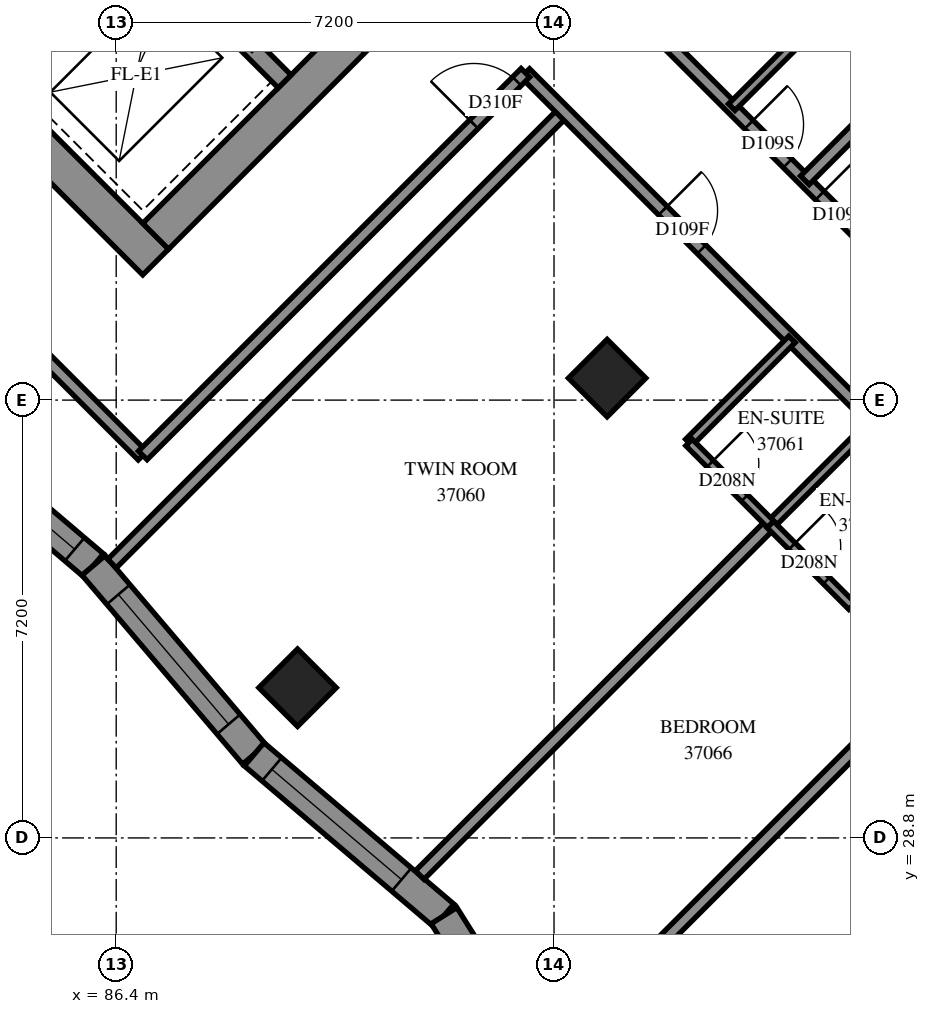
"""IFC4 building model, lengths in metres.
Left out: names, types, materials, properties, quantities, classifications, styles, units other than length and angle.
Written with IfcOpenShell. Run it as: python <this file> out.ifc"""

import sys

from ifc_helpers import new_model, si_unit, direction, frame, frame_2d, origin, origin_2d, place, context, subcontext, project, spatial, polyline, rectangle, outline, extrude, element, fill, save


model = new_model("IFC4")
c1 = context("Model", 3, precision=1e-05, world=origin(), true_north=direction((0.0, 1.0)))
c2 = subcontext(c1, "Body", "Model", "MODEL_VIEW")
j1 = project(units=[si_unit("LENGTHUNIT", "METRE"), si_unit("PLANEANGLEUNIT", "RADIAN")], contexts=[c1])
p1 = place(None, origin())
s1 = spatial("IfcSite", under=j1, at=p1, CompositionType="ELEMENT")
p2 = place(p1, origin())
s2 = spatial("IfcBuilding", under=s1, at=p2, CompositionType="ELEMENT")
p3 = place(p2, frame((0.0, 0.0, 138.8)))
s3 = spatial("IfcBuildingStorey", under=s2, at=p3, CompositionType="ELEMENT", Elevation=138.8)
for number, where, z_axis, x_axis in (
    (1, (94.474, 36.362, 0.0), (0.0, 0.0, 1.0), (0.707, -0.707, 0.0)),
    (2, (89.382, 31.271, 0.0), (0.0, 0.0, 1.0), (0.707, -0.707, 0.0)),
):
    element("IfcColumn", number, at=place(p3, frame(where, z_axis=z_axis, x_axis=x_axis)), inside=s3, PredefinedType="COLUMN", context=c2, shape_type="SweptSolid", body=[
        extrude(rectangle(XDim=0.9, YDim=0.9, at=origin_2d()), origin(), (0.0, 0.0, 1.0), 3.1),
    ])
p4 = place(p3, frame((76.018, 49.302, -0.3), z_axis=(0.0, 0.0, 1.0), x_axis=(0.7071067812, -0.7071067812, 0.0)))
e3 = element("IfcWall", 3, at=p4, inside=s3, PredefinedType="SHEAR", context=c2, shape_type="SweptSolid", body=[
    extrude(rectangle(XDim=15.6, YDim=0.6, at=frame_2d((7.8, 0.0))), origin(), (0.0, 0.0, 1.0), 2.7),
])
p5 = place(p3, frame((87.049, 38.695, -0.3), z_axis=(0.0, 0.0, 1.0), x_axis=(0.7071067812, 0.7071067812, 0.0)))
e4 = element("IfcWall", 4, at=p5, inside=s3, PredefinedType="SHEAR", context=c2, shape_type="SweptSolid", body=[
    extrude(rectangle(XDim=14.4, YDim=0.6, at=frame_2d((7.2, 0.0))), origin(), (0.0, 0.0, 1.0), 2.7),
])
p6 = place(p5, frame((4.55, 0.0, 0.3)))
e5 = element("IfcOpeningElement", 5, at=p6, cuts=e4, PredefinedType="OPENING", context=c2, shape_type="SweptSolid", body=[
    extrude(rectangle(XDim=1.1, YDim=2.1, at=frame_2d((0.55, 1.05))), frame((0.0, 0.31, 0.0), z_axis=(0.0, -1.0, 0.0), x_axis=(1.0, 0.0, 0.0)), (0.0, 0.0, 1.0), 0.62),
])
p7 = place(p5, frame((11.35, 0.0, 0.3)))
e6 = element("IfcOpeningElement", 6, at=p7, cuts=e4, PredefinedType="OPENING", context=c2, shape_type="SweptSolid", body=[
    extrude(rectangle(XDim=1.1, YDim=2.1, at=frame_2d((0.55, 1.05))), frame((0.0, 0.31, 0.0), z_axis=(0.0, -1.0, 0.0), x_axis=(1.0, 0.0, 0.0)), (0.0, 0.0, 1.0), 0.62),
])
p8 = place(p3, frame((84.291, 41.453, 0.0), z_axis=(0.0, 0.0, 1.0), x_axis=(0.7071067812, 0.7071067812, 0.0)))
e7 = element("IfcWall", 7, at=p8, inside=s3, PredefinedType="SOLIDWALL", context=c2, shape_type="SweptSolid", body=[
    extrude(rectangle(XDim=3.3, YDim=0.3, at=frame_2d((1.65, 0.0))), origin(), (0.0, 0.0, 1.0), 3.1),
])
p9 = place(p3, frame((78.988, 51.423, 0.0), z_axis=(0.0, 0.0, 1.0), x_axis=(0.7071067812, -0.7071067812, 0.0)))
e8 = element("IfcWall", 8, at=p9, inside=s3, PredefinedType="SOLIDWALL", context=c2, shape_type="SweptSolid", body=[
    extrude(rectangle(XDim=14.4, YDim=0.3, at=frame_2d((7.2, 0.0))), origin(), (0.0, 0.0, 1.0), 3.1),
])
p10 = place(p9, frame((1.35, 0.0, 0.0)))
e9 = element("IfcOpeningElement", 9, at=p10, cuts=e8, PredefinedType="OPENING", context=c2, shape_type="SweptSolid", body=[
    extrude(rectangle(XDim=0.9, YDim=2.1, at=frame_2d((0.45, 1.05))), frame((0.0, 0.16, 0.0), z_axis=(0.0, -1.0, 0.0), x_axis=(1.0, 0.0, 0.0)), (0.0, 0.0, 1.0), 0.32),
])
p11 = place(p9, frame((4.95, 0.0, 0.0)))
e10 = element("IfcOpeningElement", 10, at=p11, cuts=e8, PredefinedType="OPENING", context=c2, shape_type="SweptSolid", body=[
    extrude(rectangle(XDim=0.9, YDim=2.1, at=frame_2d((0.45, 1.05))), frame((0.0, 0.16, 0.0), z_axis=(0.0, -1.0, 0.0), x_axis=(1.0, 0.0, 0.0)), (0.0, 0.0, 1.0), 0.32),
])
p12 = place(p9, frame((8.55, 0.0, 0.0)))
e11 = element("IfcOpeningElement", 11, at=p12, cuts=e8, PredefinedType="OPENING", context=c2, shape_type="SweptSolid", body=[
    extrude(rectangle(XDim=0.9, YDim=2.1, at=frame_2d((0.45, 1.05))), frame((0.0, 0.16, 0.0), z_axis=(0.0, -1.0, 0.0), x_axis=(1.0, 0.0, 0.0)), (0.0, 0.0, 1.0), 0.32),
])
p13 = place(p9, frame((12.05, 0.0, 0.0)))
e12 = element("IfcOpeningElement", 12, at=p13, cuts=e8, PredefinedType="OPENING", context=c2, shape_type="SweptSolid", body=[
    extrude(rectangle(XDim=1.1, YDim=2.1, at=frame_2d((0.55, 1.05))), frame((0.0, 0.16, 0.0), z_axis=(0.0, -1.0, 0.0), x_axis=(1.0, 0.0, 0.0)), (0.0, 0.0, 1.0), 0.32),
])
p14 = place(p3, frame((82.921, 35.923, 0.0), z_axis=(0.0, 0.0, 1.0), x_axis=(0.7620191747, -0.647554459, 0.0)))
e13 = element("IfcWall", 13, at=p14, inside=s3, PredefinedType="SOLIDWALL", context=c2, shape_type="SweptSolid", body=[
    extrude(outline(polyline([(-0.02, -0.25), (4.058, -0.25), (4.098, 0.25), (0.02, 0.25), (-0.02, -0.25)])), origin(), (0.0, 0.0, 1.0), 3.1),
])
p15 = place(p14, frame((0.87, 0.0, 0.45)))
e14 = element("IfcOpeningElement", 14, at=p15, cuts=e13, PredefinedType="OPENING", context=c2, shape_type="SweptSolid", body=[
    extrude(rectangle(XDim=2.8, YDim=2.5, at=frame_2d((1.4, 1.25))), frame((0.0, 0.26, 0.0), z_axis=(0.0, -1.0, 0.0), x_axis=(1.0, 0.0, 0.0)), (0.0, 0.0, 1.0), 0.52),
])
p16 = place(p3, frame((86.028, 33.282, 0.0), z_axis=(0.0, 0.0, 1.0), x_axis=(0.647554459, -0.7620191747, 0.0)))
e15 = element("IfcWall", 15, at=p16, inside=s3, PredefinedType="SOLIDWALL", context=c2, shape_type="SweptSolid", body=[
    extrude(outline(polyline([(0.02, -0.25), (4.098, -0.25), (4.058, 0.25), (-0.02, 0.25), (0.02, -0.25)])), origin(), (0.0, 0.0, 1.0), 3.1),
])
p17 = place(p16, frame((0.629, 0.0, 0.45)))
e16 = element("IfcOpeningElement", 16, at=p17, cuts=e15, PredefinedType="OPENING", context=c2, shape_type="SweptSolid", body=[
    extrude(rectangle(XDim=2.8, YDim=2.5, at=frame_2d((1.4, 1.25))), frame((0.0, 0.26, 0.0), z_axis=(0.0, -1.0, 0.0), x_axis=(1.0, 0.0, 0.0)), (0.0, 0.0, 1.0), 0.52),
])
p18 = place(p3, frame((88.669, 30.175, 0.0), z_axis=(0.0, 0.0, 1.0), x_axis=(0.76200858, -0.6475669262, 0.0)))
e17 = element("IfcWall", 17, at=p18, inside=s3, PredefinedType="SOLIDWALL", context=c2, shape_type="SweptSolid", body=[
    extrude(outline(polyline([(-0.02, -0.25), (4.058, -0.25), (4.135, 0.25), (0.02, 0.25), (-0.02, -0.25)])), origin(), (0.0, 0.0, 1.0), 3.1),
])
p19 = place(p18, frame((0.38, 0.0, 0.45)))
e18 = element("IfcOpeningElement", 18, at=p19, cuts=e17, PredefinedType="OPENING", context=c2, shape_type="SweptSolid", body=[
    extrude(rectangle(XDim=2.8, YDim=2.5, at=frame_2d((1.4, 1.25))), frame((0.0, 0.26, 0.0), z_axis=(0.0, -1.0, 0.0), x_axis=(1.0, 0.0, 0.0)), (0.0, 0.0, 1.0), 0.52),
])
p20 = place(p3, frame((91.791, 27.522, 0.0), z_axis=(0.0, 0.0, 1.0), x_axis=(0.5315858435, -0.847004422, 0.0)))
e19 = element("IfcWall", 19, at=p20, inside=s3, PredefinedType="SOLIDWALL", context=c2, shape_type="SweptSolid", body=[
    extrude(outline(polyline([(0.038, -0.25), (4.208, -0.25), (3.808, 0.25), (-0.038, 0.25), (0.038, -0.25)])), origin(), (0.0, 0.0, 1.0), 3.1),
])
p21 = place(p20, frame((0.96, 0.0, 0.45)))
e20 = element("IfcOpeningElement", 20, at=p21, cuts=e19, PredefinedType="OPENING", context=c2, shape_type="SweptSolid", body=[
    extrude(rectangle(XDim=1.2, YDim=2.5, at=frame_2d((0.6, 1.25))), frame((0.0, 0.26, 0.0), z_axis=(0.0, -1.0, 0.0), x_axis=(1.0, 0.0, 0.0)), (0.0, 0.0, 1.0), 0.52),
])
p22 = place(p3, frame((86.331, 33.312, 0.0), z_axis=(0.0, 0.0, 1.0), x_axis=(0.7071067812, 0.7071067812, 0.0)))
e21 = element("IfcWall", 21, at=p22, inside=s3, PredefinedType="PARTITIONING", context=c2, shape_type="SweptSolid", body=[
    extrude(rectangle(XDim=10.514, YDim=0.2, at=frame_2d((5.257, 0.0))), origin(), (0.0, 0.0, 1.0), 3.1),
])
p23 = place(p3, frame((93.127, 41.379, 0.0), z_axis=(0.0, 0.0, 1.0), x_axis=(0.7071067812, -0.7071067812, 0.0)))
e22 = element("IfcWall", 22, at=p23, inside=s3, PredefinedType="PARTITIONING", context=c2, shape_type="SweptSolid", body=[
    extrude(rectangle(XDim=9.39, YDim=0.2, at=frame_2d((4.695, 0.0))), origin(), (0.0, 0.0, 1.0), 3.1),
])
p24 = place(p23, frame((3.2, 0.0, 0.0)))
e23 = element("IfcOpeningElement", 23, at=p24, cuts=e22, PredefinedType="OPENING", context=c2, shape_type="SweptSolid", body=[
    extrude(rectangle(XDim=0.9, YDim=2.1, at=frame_2d((0.45, 1.05))), frame((0.0, 0.11, 0.0), z_axis=(0.0, -1.0, 0.0), x_axis=(1.0, 0.0, 0.0)), (0.0, 0.0, 1.0), 0.22),
])
p25 = place(p3, frame((80.423, 41.497, 0.0), z_axis=(0.0, 0.0, 1.0), x_axis=(0.7071067812, -0.7071067812, 0.0)))
e24 = element("IfcWall", 24, at=p25, inside=s3, PredefinedType="PARTITIONING", context=c2, shape_type="SweptSolid", body=[
    extrude(rectangle(XDim=9.065, YDim=0.2, at=frame_2d((4.532, 0.0))), origin(), (0.0, 0.0, 1.0), 3.1),
])
p26 = place(p3, frame((86.837, 35.091, 0.0), z_axis=(0.0, 0.0, 1.0), x_axis=(0.7071067812, 0.7071067812, 0.0)))
e25 = element("IfcWall", 25, at=p26, inside=s3, PredefinedType="PARTITIONING", context=c2, shape_type="SweptSolid", body=[
    extrude(rectangle(XDim=8.898, YDim=0.2, at=frame_2d((4.449, 0.0))), origin(), (0.0, 0.0, 1.0), 3.1),
])
p27 = place(p26, frame((7.7, 0.0, 0.0)))
e26 = element("IfcOpeningElement", 26, at=p27, cuts=e25, PredefinedType="OPENING", context=c2, shape_type="SweptSolid", body=[
    extrude(rectangle(XDim=1.0, YDim=2.1, at=frame_2d((0.5, 1.05))), frame((0.0, 0.11, 0.0), z_axis=(0.0, -1.0, 0.0), x_axis=(1.0, 0.0, 0.0)), (0.0, 0.0, 1.0), 0.22),
])
p28 = place(p3, frame((95.177, 42.157, 0.0), z_axis=(0.0, 0.0, 1.0), x_axis=(0.7071067812, -0.7071067812, 0.0)))
e27 = element("IfcWall", 27, at=p28, inside=s3, PredefinedType="PARTITIONING", context=c2, shape_type="SweptSolid", body=[
    extrude(rectangle(XDim=8.491, YDim=0.2, at=frame_2d((4.245, 0.0))), origin(), (0.0, 0.0, 1.0), 3.1),
])
p29 = place(p28, frame((2.3, 0.0, 0.0)))
e28 = element("IfcOpeningElement", 28, at=p29, cuts=e27, PredefinedType="OPENING", context=c2, shape_type="SweptSolid", body=[
    extrude(rectangle(XDim=0.9, YDim=2.1, at=frame_2d((0.45, 1.05))), frame((0.0, 0.11, 0.0), z_axis=(0.0, -1.0, 0.0), x_axis=(1.0, 0.0, 0.0)), (0.0, 0.0, 1.0), 0.22),
])
p30 = place(p28, frame((3.95, 0.0, 0.0)))
e29 = element("IfcOpeningElement", 29, at=p30, cuts=e27, PredefinedType="OPENING", context=c2, shape_type="SweptSolid", body=[
    extrude(rectangle(XDim=0.9, YDim=2.1, at=frame_2d((0.45, 1.05))), frame((0.0, 0.11, 0.0), z_axis=(0.0, -1.0, 0.0), x_axis=(1.0, 0.0, 0.0)), (0.0, 0.0, 1.0), 0.22),
])
p31 = place(p3, frame((91.391, 28.19, 0.0), z_axis=(0.0, 0.0, 1.0), x_axis=(0.7071067812, 0.7071067812, 0.0)))
e30 = element("IfcWall", 30, at=p31, inside=s3, PredefinedType="PARTITIONING", context=c2, shape_type="SweptSolid", body=[
    extrude(rectangle(XDim=8.158, YDim=0.2, at=frame_2d((4.079, 0.0))), origin(), (0.0, 0.0, 1.0), 3.1),
])
p32 = place(p3, frame((94.923, 26.631, 0.0), z_axis=(0.0, 0.0, 1.0), x_axis=(0.7071067812, 0.7071067812, 0.0)))
e31 = element("IfcWall", 31, at=p32, inside=s3, PredefinedType="PARTITIONING", context=c2, shape_type="SweptSolid", body=[
    extrude(rectangle(XDim=5.926, YDim=0.2, at=frame_2d((2.963, 0.0))), origin(), (0.0, 0.0, 1.0), 2.6),
])
for number, where, z_axis, x_axis in (
    (32, (96.523, 40.817, 0.0), (0.0, 0.0, 1.0), (0.707, 0.707, 0.0)),
    (33, (98.503, 32.615, 0.0), (0.0, 0.0, 1.0), (0.707, 0.707, 0.0)),
):
    element("IfcWall", number, at=place(p3, frame(where, z_axis=z_axis, x_axis=x_axis)), inside=s3, PredefinedType="PARTITIONING", context=c2, shape_type="SweptSolid", body=[
        extrude(rectangle(XDim=2.401, YDim=0.15, at=frame_2d((1.201, 0.0))), origin(), (0.0, 0.0, 1.0), 3.1),
    ])
p33 = place(p3, frame((97.163, 33.955, 0.0), z_axis=(0.0, 0.0, 1.0), x_axis=(0.7075233388, 0.706689978, 0.0)))
e34 = element("IfcWall", 34, at=p33, inside=s3, PredefinedType="PARTITIONING", context=c2, shape_type="SweptSolid", body=[
    extrude(rectangle(XDim=2.4, YDim=0.15, at=frame_2d((1.2, 0.0))), origin(), (0.0, 0.0, 1.0), 3.1),
])
p34 = place(p3, frame((95.817, 35.303, 0.0), z_axis=(0.0, 0.0, 1.0), x_axis=(0.7071067812, 0.7071067812, 0.0)))
e35 = element("IfcWall", 35, at=p34, inside=s3, PredefinedType="PARTITIONING", context=c2, shape_type="SweptSolid", body=[
    extrude(rectangle(XDim=2.398, YDim=0.15, at=frame_2d((1.199, 0.0))), origin(), (0.0, 0.0, 1.0), 3.1),
])
p35 = place(p3, frame((97.725, 39.615, 0.0), z_axis=(0.0, 0.0, 1.0), x_axis=(0.7065975219, 0.707615674, 0.0)))
e36 = element("IfcWall", 36, at=p35, inside=s3, PredefinedType="PARTITIONING", context=c2, shape_type="SweptSolid", body=[
    extrude(rectangle(XDim=1.964, YDim=0.2, at=frame_2d((0.982, 0.0))), origin(), (0.0, 0.0, 1.0), 3.1),
])
p36 = place(p3, frame((97.157, 33.955, 0.0), z_axis=(0.0, 0.0, 1.0), x_axis=(0.7071067812, -0.7071067812, 0.0)))
e37 = element("IfcWall", 37, at=p36, inside=s3, PredefinedType="PARTITIONING", context=c2, shape_type="SweptSolid", body=[
    extrude(rectangle(XDim=1.901, YDim=0.15, at=frame_2d((0.95, 0.0))), origin(), (0.0, 0.0, 1.0), 3.1),
])
p37 = place(p36, frame((0.506, 0.0, 0.0)))
e38 = element("IfcOpeningElement", 38, at=p37, cuts=e37, PredefinedType="OPENING", context=c2, shape_type="SweptSolid", body=[
    extrude(rectangle(XDim=0.8, YDim=2.1, at=frame_2d((0.4, 1.05))), frame((0.0, 0.085, 0.0), z_axis=(0.0, -1.0, 0.0), x_axis=(1.0, 0.0, 0.0)), (0.0, 0.0, 1.0), 0.17),
])
p38 = place(p3, frame((95.82, 35.304, 0.0), z_axis=(0.0, 0.0, 1.0), x_axis=(0.7065800724, -0.7076330979, 0.0)))
e39 = element("IfcWall", 39, at=p38, inside=s3, PredefinedType="PARTITIONING", context=c2, shape_type="SweptSolid", body=[
    extrude(rectangle(XDim=1.899, YDim=0.15, at=frame_2d((0.95, 0.0))), origin(), (0.0, 0.0, 1.0), 3.1),
])
p39 = place(p38, frame((0.493, 0.0, 0.0)))
e40 = element("IfcOpeningElement", 40, at=p39, cuts=e39, PredefinedType="OPENING", context=c2, shape_type="SweptSolid", body=[
    extrude(rectangle(XDim=0.8, YDim=2.1, at=frame_2d((0.4, 1.05))), frame((0.0, 0.085, 0.0), z_axis=(0.0, -1.0, 0.0), x_axis=(1.0, 0.0, 0.0)), (0.0, 0.0, 1.0), 0.17),
])
p40 = place(p15, origin())
e41 = element("IfcWindow", 41, at=p40, inside=s3, PartitioningType="SINGLE_PANEL", PredefinedType="WINDOW", context=c2, shape_type="SweptSolid", body=[
    extrude(rectangle(XDim=2.8, YDim=2.5, at=frame_2d((1.4, 1.25))), frame((0.0, 0.18, 0.0), z_axis=(0.0, -1.0, 0.0), x_axis=(1.0, 0.0, 0.0)), (0.0, 0.0, 1.0), 0.06),
])
fill(e14, e41)
p41 = place(p17, origin())
e42 = element("IfcWindow", 42, at=p41, inside=s3, PartitioningType="SINGLE_PANEL", PredefinedType="WINDOW", context=c2, shape_type="SweptSolid", body=[
    extrude(rectangle(XDim=2.8, YDim=2.5, at=frame_2d((1.4, 1.25))), frame((0.0, 0.18, 0.0), z_axis=(0.0, -1.0, 0.0), x_axis=(1.0, 0.0, 0.0)), (0.0, 0.0, 1.0), 0.06),
])
fill(e16, e42)
p42 = place(p19, origin())
e43 = element("IfcWindow", 43, at=p42, inside=s3, PartitioningType="SINGLE_PANEL", PredefinedType="WINDOW", context=c2, shape_type="SweptSolid", body=[
    extrude(rectangle(XDim=2.8, YDim=2.5, at=frame_2d((1.4, 1.25))), frame((0.0, 0.18, 0.0), z_axis=(0.0, -1.0, 0.0), x_axis=(1.0, 0.0, 0.0)), (0.0, 0.0, 1.0), 0.06),
])
fill(e18, e43)
p43 = place(p29, origin())
e44 = element("IfcDoor", 44, at=p43, inside=s3, OperationType="SINGLE_SWING_RIGHT", PredefinedType="DOOR", context=c2, shape_type="SweptSolid", body=[
    extrude(rectangle(XDim=0.9, YDim=2.1, at=frame_2d((0.45, 1.05))), frame((0.0, 0.025, 0.0), z_axis=(0.0, -1.0, 0.0), x_axis=(1.0, 0.0, 0.0)), (0.0, 0.0, 1.0), 0.05),
])
fill(e28, e44)
p44 = place(p27, origin())
e45 = element("IfcDoor", 45, at=p44, inside=s3, OperationType="SINGLE_SWING_LEFT", PredefinedType="DOOR", context=c2, shape_type="SweptSolid", body=[
    extrude(rectangle(XDim=1.0, YDim=2.1, at=frame_2d((0.5, 1.05))), frame((0.0, 0.025, 0.0), z_axis=(0.0, -1.0, 0.0), x_axis=(1.0, 0.0, 0.0)), (0.0, 0.0, 1.0), 0.05),
])
fill(e26, e45)
p45 = place(p24, origin())
e46 = element("IfcDoor", 46, at=p45, inside=s3, OperationType="SINGLE_SWING_LEFT", PredefinedType="DOOR", context=c2, shape_type="SweptSolid", body=[
    extrude(rectangle(XDim=0.9, YDim=2.1, at=frame_2d((0.45, 1.05))), frame((0.0, 0.025, 0.0), z_axis=(0.0, -1.0, 0.0), x_axis=(1.0, 0.0, 0.0)), (0.0, 0.0, 1.0), 0.05),
])
fill(e23, e46)
p46 = place(p39, origin())
e47 = element("IfcDoor", 47, at=p46, inside=s3, OperationType="SINGLE_SWING_RIGHT", PredefinedType="DOOR", context=c2, shape_type="SweptSolid", body=[
    extrude(rectangle(XDim=0.8, YDim=2.1, at=frame_2d((0.4, 1.05))), frame((0.0, 0.025, 0.0), z_axis=(0.0, -1.0, 0.0), x_axis=(1.0, 0.0, 0.0)), (0.0, 0.0, 1.0), 0.05),
])
fill(e40, e47)
p47 = place(p30, origin())
e48 = element("IfcDoor", 48, at=p47, inside=s3, OperationType="SINGLE_SWING_LEFT", PredefinedType="DOOR", context=c2, shape_type="SweptSolid", body=[
    extrude(rectangle(XDim=0.9, YDim=2.1, at=frame_2d((0.45, 1.05))), frame((0.0, 0.025, 0.0), z_axis=(0.0, -1.0, 0.0), x_axis=(1.0, 0.0, 0.0)), (0.0, 0.0, 1.0), 0.05),
])
fill(e29, e48)
p48 = place(p37, origin())
e49 = element("IfcDoor", 49, at=p48, inside=s3, OperationType="SINGLE_SWING_RIGHT", PredefinedType="DOOR", context=c2, shape_type="SweptSolid", body=[
    extrude(rectangle(XDim=0.8, YDim=2.1, at=frame_2d((0.4, 1.05))), frame((0.0, 0.025, 0.0), z_axis=(0.0, -1.0, 0.0), x_axis=(1.0, 0.0, 0.0)), (0.0, 0.0, 1.0), 0.05),
])
fill(e38, e49)
save(model, sys.argv[1])
